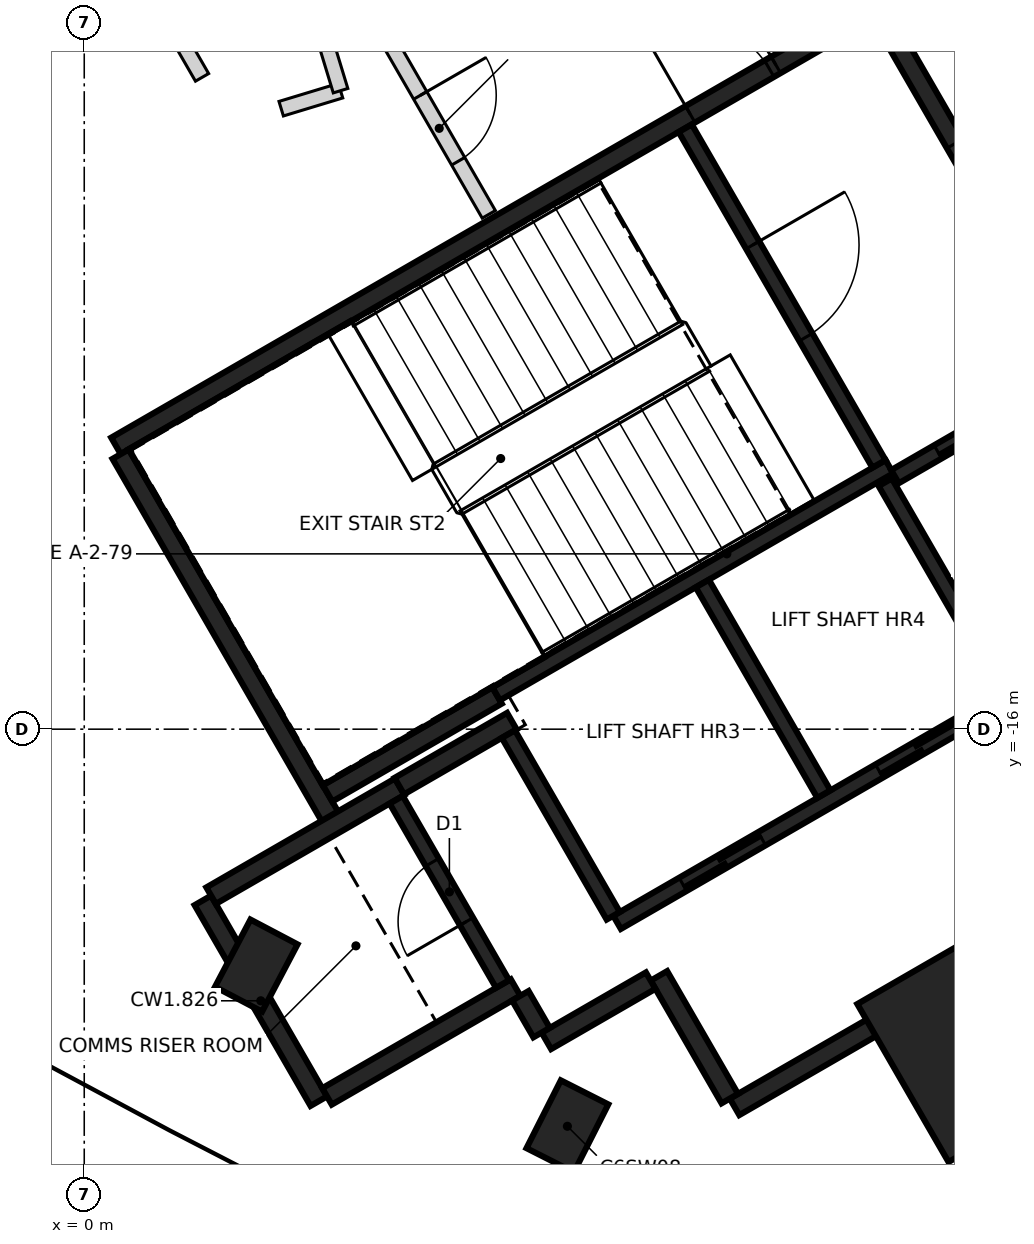
"""IFC4 building model, lengths in metres.
Left out: names, types, materials, properties, quantities, classifications, styles, units other than length and angle.
Written with IfcOpenShell. Run it as: python <this file> out.ifc"""

import sys

from ifc_helpers import new_model, si_unit, direction, frame, frame_2d, origin, origin_2d, place, context, subcontext, project, spatial, rectangle, extrude, element, fill, save


model = new_model("IFC4")
c1 = context("Model", 3, precision=1e-05, world=origin(), true_north=direction((0.0, 1.0)))
c2 = subcontext(c1, "Body", "Model", "MODEL_VIEW")
j1 = project(units=[si_unit("LENGTHUNIT", "METRE"), si_unit("PLANEANGLEUNIT", "RADIAN")], contexts=[c1])
p1 = place(None, origin())
s1 = spatial("IfcSite", under=j1, at=p1, CompositionType="ELEMENT")
p2 = place(p1, origin())
s2 = spatial("IfcBuilding", under=s1, at=p2, CompositionType="ELEMENT")
p3 = place(p2, frame((0.0, 0.0, 280.2)))
s3 = spatial("IfcBuildingStorey", under=s2, at=p3, CompositionType="ELEMENT", Elevation=280.2)
for number, where, z_axis, x_axis in (
    (1, (2.263, -19.11, -0.35), (0.0, 0.0, 1.0), (0.466, 0.885, 0.0)),
    (2, (6.356, -21.224, -0.35), (0.0, 0.0, 1.0), (0.452, 0.892, 0.0)),
):
    element("IfcColumn", number, at=place(p3, frame(where, z_axis=z_axis, x_axis=x_axis)), inside=s3, PredefinedType="COLUMN", context=c2, shape_type="SweptSolid", body=[
        extrude(rectangle(XDim=1.0, YDim=0.7, at=origin_2d()), origin(), (0.0, 0.0, 1.0), 3.6),
    ])
p4 = place(p3, frame((11.637, -20.155, -0.35), z_axis=(0.0, 0.0, 1.0), x_axis=(-0.5, 0.866025403784, 0.0)))
e3 = element("IfcColumn", 3, at=p4, inside=s3, PredefinedType="COLUMN", context=c2, shape_type="SweptSolid", body=[
    extrude(rectangle(XDim=2.4, YDim=2.0, at=origin_2d()), origin(), (0.0, 0.0, 1.0), 3.6),
])
p5 = place(p3, frame((0.417, -12.273, 0.0), z_axis=(0.0, 0.0, 1.0), x_axis=(0.866021906294, 0.500006057782, 0.0)))
e4 = element("IfcWall", 4, at=p5, inside=s3, PredefinedType="SHEAR", context=c2, shape_type="SweptSolid", body=[
    extrude(rectangle(XDim=11.55, YDim=0.25, at=frame_2d((5.775, 0.0))), origin(), (0.0, 0.0, 1.0), 3.25),
])
p6 = place(p5, frame((10.025, 0.0, 0.0)))
e5 = element("IfcOpeningElement", 5, at=p6, cuts=e4, PredefinedType="OPENING", context=c2, shape_type="SweptSolid", body=[
    extrude(rectangle(XDim=1.2, YDim=2.1, at=frame_2d((0.6, 1.05))), frame((0.0, 0.135, 0.0), z_axis=(0.0, -1.0, 0.0), x_axis=(1.0, 0.0, 0.0)), (0.0, 0.0, 1.0), 0.27),
])
p7 = place(p5, frame((8.725, 0.0, 0.0)))
e6 = element("IfcOpeningElement", 6, at=p7, cuts=e4, PredefinedType="OPENING", context=c2, shape_type="SweptSolid", body=[
    extrude(rectangle(XDim=1.2, YDim=2.1, at=frame_2d((0.6, 1.05))), frame((0.0, 0.135, 0.0), z_axis=(0.0, -1.0, 0.0), x_axis=(1.0, 0.0, 0.0)), (0.0, 0.0, 1.0), 0.27),
])
p8 = place(p3, frame((16.133, -16.594, 0.0), z_axis=(0.0, 0.0, 1.0), x_axis=(-0.866022959057, -0.500004234368, 0.0)))
e7 = element("IfcWall", 7, at=p8, inside=s3, PredefinedType="SHEAR", context=c2, shape_type="SweptSolid", body=[
    extrude(rectangle(XDim=8.75, YDim=0.25, at=frame_2d((4.375, 0.0))), origin(), (0.0, 0.0, 1.0), 3.25),
])
p9 = place(p3, frame((3.235, -17.153, 0.0), z_axis=(0.0, 0.0, 1.0), x_axis=(-0.500008851346, 0.866020293397, 0.0)))
e8 = element("IfcWall", 8, at=p9, inside=s3, PredefinedType="SHEAR", context=c2, shape_type="SweptSolid", body=[
    extrude(rectangle(XDim=5.51, YDim=0.25, at=frame_2d((2.755, 0.0))), origin(), (0.0, 0.0, 1.0), 3.25),
])
p10 = place(p3, frame((10.483, -6.606, 0.0), z_axis=(0.0, 0.0, 1.0), x_axis=(0.49999885962, -0.866026062182, 0.0)))
e9 = element("IfcWall", 9, at=p10, inside=s3, PredefinedType="SHEAR", context=c2, shape_type="SweptSolid", body=[
    extrude(rectangle(XDim=5.225, YDim=0.25, at=frame_2d((2.612, 0.0))), origin(), (0.0, 0.0, 1.0), 3.25),
])
p11 = place(p10, frame((1.95, 0.0, 0.0)))
e10 = element("IfcOpeningElement", 10, at=p11, cuts=e9, PredefinedType="OPENING", context=c2, shape_type="SweptSolid", body=[
    extrude(rectangle(XDim=1.2, YDim=2.1, at=frame_2d((0.6, 1.05))), frame((0.0, 0.135, 0.0), z_axis=(0.0, -1.0, 0.0), x_axis=(1.0, 0.0, 0.0)), (0.0, 0.0, 1.0), 0.27),
])
p12 = place(p3, frame((3.085, -20.894, 0.0), z_axis=(0.0, 0.0, 1.0), x_axis=(-0.499978833458, 0.866037623948, 0.0)))
e11 = element("IfcWall", 11, at=p12, inside=s3, PredefinedType="SHEAR", context=c2, shape_type="SweptSolid", body=[
    extrude(rectangle(XDim=3.05, YDim=0.25, at=frame_2d((1.525, 0.0))), origin(), (0.0, 0.0, 1.0), 3.25),
])
p13 = place(p3, frame((1.669, -18.19, 0.0), z_axis=(0.0, 0.0, 1.0), x_axis=(0.866042235819, 0.499970844928, 0.0)))
e12 = element("IfcWall", 12, at=p13, inside=s3, PredefinedType="SHEAR", context=c2, shape_type="SweptSolid", body=[
    extrude(rectangle(XDim=2.865, YDim=0.25, at=frame_2d((1.432, 0.0))), origin(), (0.0, 0.0, 1.0), 3.25),
])
p14 = place(p3, frame((5.675, -19.399, 0.0), z_axis=(0.0, 0.0, 1.0), x_axis=(-0.866026637627, -0.499997862916, 0.0)))
e13 = element("IfcWall", 13, at=p14, inside=s3, PredefinedType="SHEAR", context=c2, shape_type="SweptSolid", body=[
    extrude(rectangle(XDim=2.865, YDim=0.25, at=frame_2d((1.432, 0.0))), origin(), (0.0, 0.0, 1.0), 3.25),
])
p15 = place(p3, frame((5.431, -15.556, 0.0), z_axis=(0.0, 0.0, 1.0), x_axis=(-0.866022940537, -0.500004266446, 0.0)))
e14 = element("IfcWall", 14, at=p15, inside=s3, PredefinedType="SHEAR", context=c2, shape_type="SweptSolid", body=[
    extrude(rectangle(XDim=2.575, YDim=0.25, at=frame_2d((1.287, 0.0))), origin(), (0.0, 0.0, 1.0), 3.25),
])
p16 = place(p3, frame((8.493, -20.86, 0.0), z_axis=(0.0, 0.0, 1.0), x_axis=(-0.500039802285, 0.866002422705, 0.0)))
e15 = element("IfcWall", 15, at=p16, inside=s3, PredefinedType="SHEAR", context=c2, shape_type="SweptSolid", body=[
    extrude(rectangle(XDim=1.865, YDim=0.25, at=frame_2d((0.932, 0.0))), origin(), (0.0, 0.0, 1.0), 3.25),
])
p17 = place(p3, frame((4.145, -16.749, 0.0), z_axis=(0.0, 0.0, 1.0), x_axis=(0.866038183914, 0.499977863513, 0.0)))
e16 = element("IfcWall", 16, at=p17, inside=s3, PredefinedType="SHEAR", context=c2, shape_type="SweptSolid", body=[
    extrude(rectangle(XDim=1.71, YDim=0.25, at=frame_2d((0.855, 0.0))), origin(), (0.0, 0.0, 1.0), 3.25),
])
p18 = place(p3, frame((7.452, -19.308, 0.0), z_axis=(0.0, 0.0, 1.0), x_axis=(-0.866044474677, -0.49996696679, 0.0)))
e17 = element("IfcWall", 17, at=p18, inside=s3, PredefinedType="SHEAR", context=c2, shape_type="SweptSolid", body=[
    extrude(rectangle(XDim=1.584, YDim=0.25, at=frame_2d((0.792, 0.0))), origin(), (0.0, 0.0, 1.0), 3.25),
])
p19 = place(p3, frame((6.017, -19.992, 0.0), z_axis=(0.0, 0.0, 1.0), x_axis=(-0.500364886717, 0.865814633822, 0.0)))
e18 = element("IfcWall", 18, at=p19, inside=s3, PredefinedType="SHEAR", context=c2, shape_type="SweptSolid", body=[
    extrude(rectangle(XDim=0.559, YDim=0.25, at=frame_2d((0.28, 0.0))), origin(), (0.0, 0.0, 1.0), 3.25),
])
p20 = place(p3, frame((5.419, -15.534, 0.0), z_axis=(0.0, 0.0, 1.0), x_axis=(0.866029065029, 0.499993658486, 0.0)))
e19 = element("IfcWall", 19, at=p20, inside=s3, PredefinedType="SHEAR", context=c2, shape_type="SweptSolid", body=[
    extrude(rectangle(XDim=5.974, YDim=0.2, at=frame_2d((2.987, 0.0))), origin(), (0.0, 0.0, 1.0), 3.25),
])
p21 = place(p3, frame((7.01, -18.542, 0.0), z_axis=(0.0, 0.0, 1.0), x_axis=(0.866030299012, 0.499991521122, 0.0)))
e20 = element("IfcWall", 20, at=p21, inside=s3, PredefinedType="SHEAR", context=c2, shape_type="SweptSolid", body=[
    extrude(rectangle(XDim=6.1, YDim=0.2, at=frame_2d((3.05, 0.0))), origin(), (0.0, 0.0, 1.0), 3.25),
])
p22 = place(p21, frame((1.0, 0.0, 0.0)))
e21 = element("IfcOpeningElement", 21, at=p22, cuts=e20, PredefinedType="OPENING", context=c2, shape_type="SweptSolid", body=[
    extrude(rectangle(XDim=1.2, YDim=2.1, at=frame_2d((0.6, 1.05))), frame((0.0, 0.11, 0.0), z_axis=(0.0, -1.0, 0.0), x_axis=(1.0, 0.0, 0.0)), (0.0, 0.0, 1.0), 0.22),
])
p23 = place(p21, frame((3.982, 0.0, 0.0)))
e22 = element("IfcOpeningElement", 22, at=p23, cuts=e20, PredefinedType="OPENING", context=c2, shape_type="SweptSolid", body=[
    extrude(rectangle(XDim=1.2, YDim=2.1, at=frame_2d((0.6, 1.05))), frame((0.0, 0.11, 0.0), z_axis=(0.0, -1.0, 0.0), x_axis=(1.0, 0.0, 0.0)), (0.0, 0.0, 1.0), 0.22),
])
p24 = place(p3, frame((7.906, -8.094, 0.0), z_axis=(0.0, 0.0, 1.0), x_axis=(0.500027839223, -0.866009330205, 0.0)))
e23 = element("IfcWall", 23, at=p24, inside=s3, PredefinedType="SHEAR", context=c2, shape_type="SweptSolid", body=[
    extrude(rectangle(XDim=5.098, YDim=0.2, at=frame_2d((2.549, 0.0))), origin(), (0.0, 0.0, 1.0), 3.25),
])
p25 = place(p24, frame((1.774, 0.0, 0.0)))
e24 = element("IfcOpeningElement", 24, at=p25, cuts=e23, PredefinedType="OPENING", context=c2, shape_type="SweptSolid", body=[
    extrude(rectangle(XDim=1.4, YDim=2.1, at=frame_2d((0.7, 1.05))), frame((0.0, 0.11, 0.0), z_axis=(0.0, -1.0, 0.0), x_axis=(1.0, 0.0, 0.0)), (0.0, 0.0, 1.0), 0.22),
])
p26 = place(p3, frame((8.132, -14.084, 0.0), z_axis=(0.0, 0.0, 1.0), x_axis=(0.499997778408, -0.866026686418, 0.0)))
e25 = element("IfcWall", 25, at=p26, inside=s3, PredefinedType="SHEAR", context=c2, shape_type="SweptSolid", body=[
    extrude(rectangle(XDim=3.198, YDim=0.2, at=frame_2d((1.599, 0.0))), origin(), (0.0, 0.0, 1.0), 3.25),
])
p27 = place(p3, frame((5.503, -19.352, 0.0), z_axis=(0.0, 0.0, 1.0), x_axis=(-0.499986818241, 0.866033014143, 0.0)))
e26 = element("IfcWall", 26, at=p27, inside=s3, PredefinedType="SHEAR", context=c2, shape_type="SweptSolid", body=[
    extrude(rectangle(XDim=2.798, YDim=0.2, at=frame_2d((1.399, 0.0))), origin(), (0.0, 0.0, 1.0), 3.25),
])
p28 = place(p27, frame((0.949, 0.0, 0.0)))
e27 = element("IfcOpeningElement", 27, at=p28, cuts=e26, PredefinedType="OPENING", context=c2, shape_type="SweptSolid", body=[
    extrude(rectangle(XDim=0.9, YDim=2.1, at=frame_2d((0.45, 1.05))), frame((0.0, 0.11, 0.0), z_axis=(0.0, -1.0, 0.0), x_axis=(1.0, 0.0, 0.0)), (0.0, 0.0, 1.0), 0.22),
])
p29 = place(p3, frame((6.96, -18.455, 0.0), z_axis=(0.0, 0.0, 1.0), x_axis=(-0.499926705758, 0.866067716099, 0.0)))
e28 = element("IfcWall", 28, at=p29, inside=s3, PredefinedType="SHEAR", context=c2, shape_type="SweptSolid", body=[
    extrude(rectangle(XDim=2.759, YDim=0.2, at=frame_2d((1.38, 0.0))), origin(), (0.0, 0.0, 1.0), 3.25),
])
p30 = place(p3, frame((12.088, -15.437, 0.0), z_axis=(0.0, 0.0, 1.0), x_axis=(-0.500026960575, 0.86600983753, 0.0)))
e29 = element("IfcWall", 29, at=p30, inside=s3, PredefinedType="SHEAR", context=c2, shape_type="SweptSolid", body=[
    extrude(rectangle(XDim=3.1, YDim=0.2, at=frame_2d((1.55, 0.0))), origin(), (0.0, 0.0, 1.0), 3.25),
])
p31 = place(p3, frame((10.666, -12.678, 0.0), z_axis=(0.0, 0.0, 1.0), x_axis=(0.866018407898, 0.500012117035, 0.0)))
e30 = element("IfcWall", 30, at=p31, inside=s3, PredefinedType="SHEAR", context=c2, shape_type="SweptSolid", body=[
    extrude(rectangle(XDim=2.651, YDim=0.2, at=frame_2d((1.325, 0.0))), origin(), (0.0, 0.0, 1.0), 3.25),
])
p32 = place(p31, frame((0.652, 0.0, 0.0)))
e31 = element("IfcOpeningElement", 31, at=p32, cuts=e30, PredefinedType="OPENING", context=c2, shape_type="SweptSolid", body=[
    extrude(rectangle(XDim=1.3, YDim=2.1, at=frame_2d((0.65, 1.05))), frame((0.0, 0.11, 0.0), z_axis=(0.0, -1.0, 0.0), x_axis=(1.0, 0.0, 0.0)), (0.0, 0.0, 1.0), 0.22),
])
p33 = place(p3, frame((1.148, -6.728, 0.0), z_axis=(0.0, 0.0, 1.0), x_axis=(0.499696187967, -0.866200738704, 0.0)))
e32 = element("IfcWall", 32, at=p33, inside=s3, PredefinedType="PARTITIONING", context=c2, shape_type="SweptSolid", body=[
    extrude(rectangle(XDim=0.805, YDim=0.2, at=frame_2d((0.402, 0.0))), origin(), (0.0, 0.0, 1.0), 3.25),
])
p34 = place(p3, frame((2.591, -7.837, 0.0), z_axis=(0.0, 0.0, 1.0), x_axis=(0.956974070788, 0.290173444409, 0.0)))
e33 = element("IfcWall", 33, at=p34, inside=s3, PredefinedType="PARTITIONING", context=c2, shape_type="SweptSolid", body=[
    extrude(rectangle(XDim=0.816, YDim=0.2, at=frame_2d((0.408, 0.0))), origin(), (0.0, 0.0, 1.0), 3.25),
])
p35 = place(p3, frame((3.11, -6.739, 0.0), z_axis=(0.0, 0.0, 1.0), x_axis=(0.291053676179, -0.95670672496, 0.0)))
e34 = element("IfcWall", 34, at=p35, inside=s3, PredefinedType="PARTITIONING", context=c2, shape_type="SweptSolid", body=[
    extrude(rectangle(XDim=0.9, YDim=0.2, at=frame_2d((0.45, 0.0))), origin(), (0.0, 0.0, 1.0), 3.25),
])
p36 = place(p3, frame((3.987, -6.911, 0.0), z_axis=(0.0, 0.0, 1.0), x_axis=(0.499458942258, -0.866337558345, 0.0)))
e35 = element("IfcWall", 35, at=p36, inside=s3, PredefinedType="PARTITIONING", context=c2, shape_type="SweptSolid", body=[
    extrude(rectangle(XDim=2.674, YDim=0.2, at=frame_2d((1.337, 0.0))), origin(), (0.0, 0.0, 1.0), 3.25),
])
p37 = place(p36, frame((0.867, 0.0, 0.0)))
e36 = element("IfcOpeningElement", 36, at=p37, cuts=e35, PredefinedType="OPENING", context=c2, shape_type="SweptSolid", body=[
    extrude(rectangle(XDim=1.0, YDim=2.1, at=frame_2d((0.5, 1.05))), frame((0.0, 0.11, 0.0), z_axis=(0.0, -1.0, 0.0), x_axis=(1.0, 0.0, 0.0)), (0.0, 0.0, 1.0), 0.22),
])
p38 = place(p32, origin())
e37 = element("IfcDoor", 37, at=p38, inside=s3, OperationType="SLIDING_TO_RIGHT", PredefinedType="DOOR", context=c2, shape_type="SweptSolid", body=[
    extrude(rectangle(XDim=1.3, YDim=2.1, at=frame_2d((0.65, 1.05))), frame((0.0, 0.025, 0.0), z_axis=(0.0, -1.0, 0.0), x_axis=(1.0, 0.0, 0.0)), (0.0, 0.0, 1.0), 0.05),
])
fill(e31, e37)
p39 = place(p22, origin())
e38 = element("IfcDoor", 38, at=p39, inside=s3, OperationType="DOUBLE_DOOR_SLIDING", PredefinedType="DOOR", context=c2, shape_type="SweptSolid", body=[
    extrude(rectangle(XDim=1.2, YDim=2.1, at=frame_2d((0.6, 1.05))), frame((0.0, 0.025, 0.0), z_axis=(0.0, -1.0, 0.0), x_axis=(1.0, 0.0, 0.0)), (0.0, 0.0, 1.0), 0.05),
])
fill(e21, e38)
p40 = place(p23, origin())
e39 = element("IfcDoor", 39, at=p40, inside=s3, OperationType="DOUBLE_DOOR_SLIDING", PredefinedType="DOOR", context=c2, shape_type="SweptSolid", body=[
    extrude(rectangle(XDim=1.2, YDim=2.1, at=frame_2d((0.6, 1.05))), frame((0.0, 0.025, 0.0), z_axis=(0.0, -1.0, 0.0), x_axis=(1.0, 0.0, 0.0)), (0.0, 0.0, 1.0), 0.05),
])
fill(e22, e39)
p41 = place(p6, origin())
e40 = element("IfcDoor", 40, at=p41, inside=s3, OperationType="SINGLE_SWING_LEFT", PredefinedType="DOOR", context=c2, shape_type="SweptSolid", body=[
    extrude(rectangle(XDim=1.2, YDim=2.1, at=frame_2d((0.6, 1.05))), frame((0.0, 0.025, 0.0), z_axis=(0.0, -1.0, 0.0), x_axis=(1.0, 0.0, 0.0)), (0.0, 0.0, 1.0), 0.05),
])
fill(e5, e40)
p42 = place(p7, origin())
e41 = element("IfcDoor", 41, at=p42, inside=s3, OperationType="SINGLE_SWING_RIGHT", PredefinedType="DOOR", context=c2, shape_type="SweptSolid", body=[
    extrude(rectangle(XDim=1.2, YDim=2.1, at=frame_2d((0.6, 1.05))), frame((0.0, 0.025, 0.0), z_axis=(0.0, -1.0, 0.0), x_axis=(1.0, 0.0, 0.0)), (0.0, 0.0, 1.0), 0.05),
])
fill(e6, e41)
p43 = place(p25, origin())
e42 = element("IfcDoor", 42, at=p43, inside=s3, OperationType="SINGLE_SWING_RIGHT", PredefinedType="DOOR", context=c2, shape_type="SweptSolid", body=[
    extrude(rectangle(XDim=1.4, YDim=2.1, at=frame_2d((0.7, 1.05))), frame((0.0, 0.025, 0.0), z_axis=(0.0, -1.0, 0.0), x_axis=(1.0, 0.0, 0.0)), (0.0, 0.0, 1.0), 0.05),
])
fill(e24, e42)
p44 = place(p28, origin())
e43 = element("IfcDoor", 43, at=p44, inside=s3, OperationType="SINGLE_SWING_LEFT", PredefinedType="DOOR", context=c2, shape_type="SweptSolid", body=[
    extrude(rectangle(XDim=0.9, YDim=2.1, at=frame_2d((0.45, 1.05))), frame((0.0, 0.025, 0.0), z_axis=(0.0, -1.0, 0.0), x_axis=(1.0, 0.0, 0.0)), (0.0, 0.0, 1.0), 0.05),
])
fill(e27, e43)
p45 = place(p11, origin())
e44 = element("IfcDoor", 44, at=p45, inside=s3, OperationType="SINGLE_SWING_LEFT", PredefinedType="DOOR", context=c2, shape_type="SweptSolid", body=[
    extrude(rectangle(XDim=1.2, YDim=2.1, at=frame_2d((0.6, 1.05))), frame((0.0, 0.025, 0.0), z_axis=(0.0, -1.0, 0.0), x_axis=(1.0, 0.0, 0.0)), (0.0, 0.0, 1.0), 0.05),
])
fill(e10, e44)
p46 = place(p37, frame((1.0, 0.0, 0.0), z_axis=(0.0, 0.0, 1.0), x_axis=(-1.0, 0.0, 0.0)))
e45 = element("IfcDoor", 45, at=p46, inside=s3, OperationType="SINGLE_SWING_LEFT", PredefinedType="DOOR", context=c2, shape_type="SweptSolid", body=[
    extrude(rectangle(XDim=1.0, YDim=2.1, at=frame_2d((0.5, 1.05))), frame((0.0, 0.025, 0.0), z_axis=(0.0, -1.0, 0.0), x_axis=(1.0, 0.0, 0.0)), (0.0, 0.0, 1.0), 0.05),
])
fill(e36, e45)
save(model, sys.argv[1])
